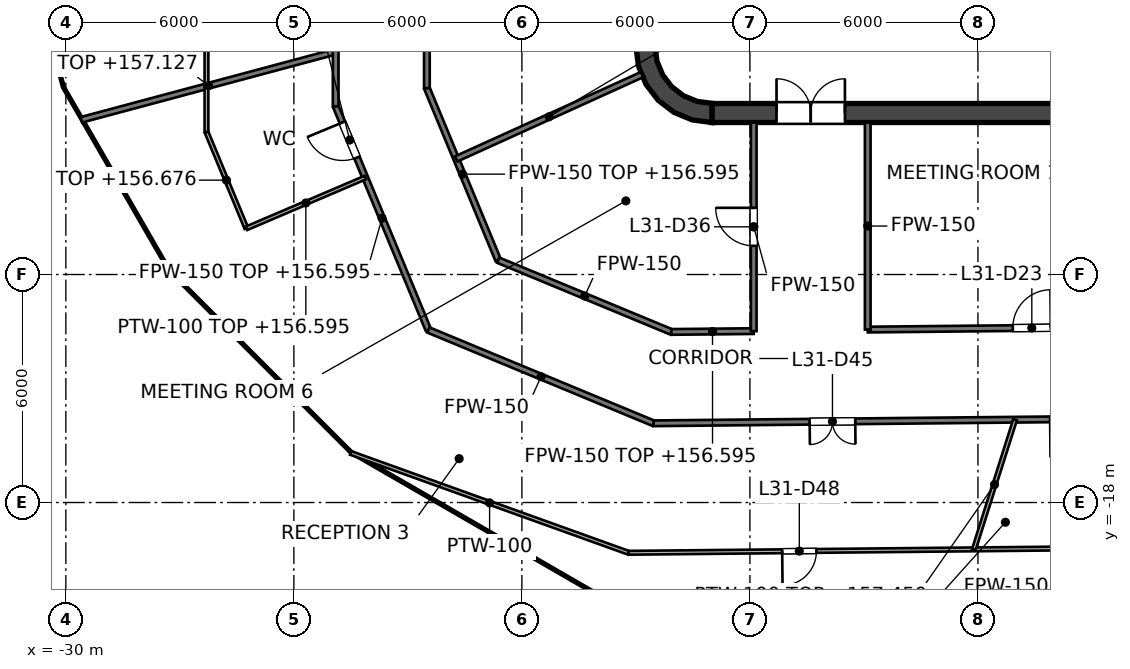
"""IFC4 building model, lengths in metres.
Left out: names, types, materials, properties, quantities, classifications, styles, units other than length and angle.
Written with IfcOpenShell. Run it as: python <this file> out.ifc"""

import sys

from ifc_helpers import new_model, si_unit, direction, frame, frame_2d, origin, place, context, subcontext, project, spatial, polyline, rectangle, outline, extrude, element, fill, save


model = new_model("IFC4")
c1 = context("Model", 3, precision=1e-05, world=origin(), true_north=direction((0.0, 1.0)))
c2 = subcontext(c1, "Body", "Model", "MODEL_VIEW")
j1 = project(units=[si_unit("LENGTHUNIT", "METRE"), si_unit("PLANEANGLEUNIT", "RADIAN")], contexts=[c1])
p1 = place(None, origin())
s1 = spatial("IfcSite", under=j1, at=p1, CompositionType="ELEMENT")
p2 = place(p1, origin())
s2 = spatial("IfcBuilding", under=s1, at=p2, CompositionType="ELEMENT")
p3 = place(p2, frame((0.0, 0.0, 153.6)))
s3 = spatial("IfcBuildingStorey", under=s2, at=p3, CompositionType="ELEMENT", Elevation=153.6)
p4 = place(p3, frame((-13.0, -7.75, 0.0), z_axis=(0.0, 0.0, 1.0), x_axis=(1.0, 0.0, 0.0)))
e1 = element("IfcWall", 1, at=p4, inside=s3, PredefinedType="SHEAR", context=c2, shape_type="SweptSolid", body=[
    extrude(rectangle(XDim=26.0, YDim=0.5, at=frame_2d((13.0, 0.0))), origin(), (0.0, 0.0, 1.0), 4.0),
])
p5 = place(p4, frame((1.7, 0.0, 0.0)))
e2 = element("IfcOpeningElement", 2, at=p5, cuts=e1, PredefinedType="OPENING", context=c2, shape_type="SweptSolid", body=[
    extrude(rectangle(XDim=1.8, YDim=2.1, at=frame_2d((0.9, 1.05))), frame((0.0, 0.25, 0.0), z_axis=(0.0, -1.0, 0.0), x_axis=(1.0, 0.0, 0.0)), (0.0, 0.0, 1.0), 0.5),
])
p6 = place(p4, frame((22.5, 0.0, 0.0)))
e3 = element("IfcOpeningElement", 3, at=p6, cuts=e1, PredefinedType="OPENING", context=c2, shape_type="SweptSolid", body=[
    extrude(rectangle(XDim=1.8, YDim=2.1, at=frame_2d((0.9, 1.05))), frame((0.0, 0.25, 0.0), z_axis=(0.0, -1.0, 0.0), x_axis=(1.0, 0.0, 0.0)), (0.0, 0.0, 1.0), 0.5),
])
p7 = place(p3, origin())
e4 = element("IfcWall", 4, at=p7, inside=s3, PredefinedType="SHEAR", context=c2, shape_type="SweptSolid", body=[
    extrude(outline(polyline([(-13.0, -8.0), (-13.0, -7.496), (-13.387, -7.445), (-13.748, -7.295), (-14.058, -7.058), (-14.295, -6.748), (-14.445, -6.387), (-14.496, -6.0), (-15.0, -6.0), (-14.932, -6.518), (-14.732, -7.0), (-14.414, -7.414), (-14.0, -7.732), (-13.518, -7.932), (-13.0, -8.0)])), origin(), (0.0, 0.0, 1.0), 4.0),
])
p8 = place(p3, frame((-9.0, -6.6, 0.0), z_axis=(0.0, 0.0, 1.0), x_axis=(0.0, 1.0, 0.0)))
e5 = element("IfcWall", 5, at=p8, inside=s3, PredefinedType="PARTITIONING", context=c2, shape_type="SweptSolid", body=[
    extrude(rectangle(XDim=2.5, YDim=0.25, at=frame_2d((1.25, 0.0))), origin(), (0.0, 0.0, 1.0), 3.85),
])
p9 = place(p8, frame((0.75, 0.0, 0.0)))
e6 = element("IfcOpeningElement", 6, at=p9, cuts=e5, PredefinedType="OPENING", context=c2, shape_type="SweptSolid", body=[
    extrude(rectangle(XDim=1.0, YDim=2.1, at=frame_2d((0.5, 1.05))), frame((0.0, 0.125, 0.0), z_axis=(0.0, -1.0, 0.0), x_axis=(1.0, 0.0, 0.0)), (0.0, 0.0, 1.0), 0.25),
])
p10 = place(p3, frame((-9.125, -7.05, 0.0), z_axis=(0.0, 0.0, 1.0), x_axis=(1.0, 0.0, 0.0)))
e7 = element("IfcWall", 7, at=p10, inside=s3, PredefinedType="SOLIDWALL", context=c2, shape_type="SweptSolid", body=[
    extrude(rectangle(XDim=18.25, YDim=0.9, at=frame_2d((9.125, 0.0))), origin(), (0.0, 0.0, 1.0), 3.85),
])
p11 = place(p3, frame((-11.8, -7.5, 0.0), z_axis=(0.0, 0.0, 1.0), x_axis=(0.0, 1.0, 0.0)))
e8 = element("IfcWall", 8, at=p11, inside=s3, PredefinedType="SOLIDWALL", context=c2, shape_type="SweptSolid", body=[
    extrude(rectangle(XDim=15.0, YDim=0.4, at=frame_2d((7.5, 0.0))), origin(), (0.0, 0.0, 1.0), 3.85),
])
p12 = place(p11, frame((11.3, 0.0, 0.0)))
e9 = element("IfcOpeningElement", 9, at=p12, cuts=e8, PredefinedType="OPENING", context=c2, shape_type="SweptSolid", body=[
    extrude(rectangle(XDim=1.1, YDim=2.1, at=frame_2d((0.55, 1.05))), frame((0.0, 0.2, 0.0), z_axis=(0.0, -1.0, 0.0), x_axis=(1.0, 0.0, 0.0)), (0.0, 0.0, 1.0), 0.4),
])
p13 = place(p11, frame((8.4, 0.0, 0.0)))
e10 = element("IfcOpeningElement", 10, at=p13, cuts=e8, PredefinedType="OPENING", context=c2, shape_type="SweptSolid", body=[
    extrude(rectangle(XDim=1.1, YDim=2.1, at=frame_2d((0.55, 1.05))), frame((0.0, 0.2, 0.0), z_axis=(0.0, -1.0, 0.0), x_axis=(1.0, 0.0, 0.0)), (0.0, 0.0, 1.0), 0.4),
])
p14 = place(p11, frame((5.5, 0.0, 0.0)))
e11 = element("IfcOpeningElement", 11, at=p14, cuts=e8, PredefinedType="OPENING", context=c2, shape_type="SweptSolid", body=[
    extrude(rectangle(XDim=1.1, YDim=2.1, at=frame_2d((0.55, 1.05))), frame((0.0, 0.2, 0.0), z_axis=(0.0, -1.0, 0.0), x_axis=(1.0, 0.0, 0.0)), (0.0, 0.0, 1.0), 0.4),
])
p15 = place(p11, frame((13.697, 0.0, 0.0)))
e12 = element("IfcOpeningElement", 12, at=p15, cuts=e8, PredefinedType="OPENING", context=c2, shape_type="SweptSolid", body=[
    extrude(rectangle(XDim=0.9, YDim=2.1, at=frame_2d((0.45, 1.05))), frame((0.0, 0.2, 0.0), z_axis=(0.0, -1.0, 0.0), x_axis=(1.0, 0.0, 0.0)), (0.0, 0.0, 1.0), 0.4),
])
p16 = place(p11, frame((0.403, 0.0, 0.0)))
e13 = element("IfcOpeningElement", 13, at=p16, cuts=e8, PredefinedType="OPENING", context=c2, shape_type="SweptSolid", body=[
    extrude(rectangle(XDim=0.9, YDim=2.1, at=frame_2d((0.45, 1.05))), frame((0.0, 0.2, 0.0), z_axis=(0.0, -1.0, 0.0), x_axis=(1.0, 0.0, 0.0)), (0.0, 0.0, 1.0), 0.4),
])
p17 = place(p3, frame((-22.9, -7.572, 0.0), z_axis=(0.0, 0.0, 1.0), x_axis=(0.382860357704, -0.923806227788, 0.0)))
e14 = element("IfcWall", 14, at=p17, inside=s3, PredefinedType="PARTITIONING", context=c2, shape_type="SweptSolid", body=[
    extrude(rectangle(XDim=6.374, YDim=0.15, at=frame_2d((3.187, 0.0))), origin(), (0.0, 0.0, 1.0), 2.995),
])
p18 = place(p17, frame((0.462, 0.0, 0.0)))
e15 = element("IfcOpeningElement", 15, at=p18, cuts=e14, PredefinedType="OPENING", context=c2, shape_type="SweptSolid", body=[
    extrude(rectangle(XDim=1.0, YDim=2.1, at=frame_2d((0.5, 1.05))), frame((0.0, 0.075, 0.0), z_axis=(0.0, -1.0, 0.0), x_axis=(1.0, 0.0, 0.0)), (0.0, 0.0, 1.0), 0.15),
])
p19 = place(p3, frame((-20.5, -7.095, 0.0), z_axis=(0.0, 0.0, 1.0), x_axis=(0.382878184095, -0.923798839653, 0.0)))
e16 = element("IfcWall", 16, at=p19, inside=s3, PredefinedType="PARTITIONING", context=c2, shape_type="SweptSolid", body=[
    extrude(rectangle(XDim=4.902, YDim=0.15, at=frame_2d((2.451, 0.0))), origin(), (0.0, 0.0, 1.0), 2.995),
])
p20 = place(p3, frame((-20.46, -13.46, 0.0), z_axis=(0.0, 0.0, 1.0), x_axis=(0.923801547606, -0.382871650349, 0.0)))
e17 = element("IfcWall", 17, at=p20, inside=s3, PredefinedType="PARTITIONING", context=c2, shape_type="SweptSolid", body=[
    extrude(rectangle(XDim=6.415, YDim=0.15, at=frame_2d((3.208, 0.0))), origin(), (0.0, 0.0, 1.0), 2.927),
])
p21 = place(p3, frame((-18.623, -11.623, 0.0), z_axis=(0.0, 0.0, 1.0), x_axis=(0.923791670587, -0.38289548098, 0.0)))
e18 = element("IfcWall", 18, at=p21, inside=s3, PredefinedType="PARTITIONING", context=c2, shape_type="SweptSolid", body=[
    extrude(rectangle(XDim=4.931, YDim=0.15, at=frame_2d((2.465, 0.0))), origin(), (0.0, 0.0, 1.0), 2.927),
])
p22 = place(p3, frame((-14.534, -15.915, 0.0), z_axis=(0.0, 0.0, 1.0), x_axis=(0.999950930262, 0.009906415532, 0.0)))
e19 = element("IfcWall", 19, at=p22, inside=s3, PredefinedType="PARTITIONING", context=c2, shape_type="SweptSolid", body=[
    extrude(rectangle(XDim=33.123, YDim=0.15, at=frame_2d((16.561, 0.0))), origin(), (0.0, 0.0, 1.0), 2.927),
])
p23 = place(p22, frame((4.106, 0.0, 0.0)))
e20 = element("IfcOpeningElement", 20, at=p23, cuts=e19, PredefinedType="OPENING", context=c2, shape_type="SweptSolid", body=[
    extrude(rectangle(XDim=1.2, YDim=2.1, at=frame_2d((0.6, 1.05))), frame((0.0, 0.075, 0.0), z_axis=(0.0, -1.0, 0.0), x_axis=(1.0, 0.0, 0.0)), (0.0, 0.0, 1.0), 0.15),
])
p24 = place(p22, frame((10.434, 0.0, 0.0)))
e21 = element("IfcOpeningElement", 21, at=p24, cuts=e19, PredefinedType="OPENING", context=c2, shape_type="SweptSolid", body=[
    extrude(rectangle(XDim=1.0, YDim=2.1, at=frame_2d((0.5, 1.05))), frame((0.0, 0.075, 0.0), z_axis=(0.0, -1.0, 0.0), x_axis=(1.0, 0.0, 0.0)), (0.0, 0.0, 1.0), 0.15),
])
p25 = place(p22, frame((12.942, 0.0, 0.0)))
e22 = element("IfcOpeningElement", 22, at=p25, cuts=e19, PredefinedType="OPENING", context=c2, shape_type="SweptSolid", body=[
    extrude(rectangle(XDim=1.0, YDim=2.1, at=frame_2d((0.5, 1.05))), frame((0.0, 0.075, 0.0), z_axis=(0.0, -1.0, 0.0), x_axis=(1.0, 0.0, 0.0)), (0.0, 0.0, 1.0), 0.15),
])
p26 = place(p22, frame((16.111, 0.0, 0.0)))
e23 = element("IfcOpeningElement", 23, at=p26, cuts=e19, PredefinedType="OPENING", context=c2, shape_type="SweptSolid", body=[
    extrude(rectangle(XDim=1.0, YDim=2.1, at=frame_2d((0.5, 1.05))), frame((0.0, 0.075, 0.0), z_axis=(0.0, -1.0, 0.0), x_axis=(1.0, 0.0, 0.0)), (0.0, 0.0, 1.0), 0.15),
])
p27 = place(p22, frame((24.318, 0.0, 0.0)))
e24 = element("IfcOpeningElement", 24, at=p27, cuts=e19, PredefinedType="OPENING", context=c2, shape_type="SweptSolid", body=[
    extrude(rectangle(XDim=1.0, YDim=2.1, at=frame_2d((0.5, 1.05))), frame((0.0, 0.075, 0.0), z_axis=(0.0, -1.0, 0.0), x_axis=(1.0, 0.0, 0.0)), (0.0, 0.0, 1.0), 0.15),
])
p28 = place(p3, frame((-14.068, -13.511, 0.0), z_axis=(0.0, 0.0, 1.0), x_axis=(0.999950911515, 0.009908307647, 0.0)))
e25 = element("IfcWall", 25, at=p28, inside=s3, PredefinedType="PARTITIONING", context=c2, shape_type="SweptSolid", body=[
    extrude(rectangle(XDim=2.168, YDim=0.15, at=frame_2d((1.084, 0.0))), origin(), (0.0, 0.0, 1.0), 2.995),
])
p29 = place(p3, frame((-8.9, -13.449, 0.0), z_axis=(0.0, 0.0, 1.0), x_axis=(0.999950834077, 0.009916119672, 0.0)))
e26 = element("IfcWall", 26, at=p29, inside=s3, PredefinedType="PARTITIONING", context=c2, shape_type="SweptSolid", body=[
    extrude(rectangle(XDim=17.801, YDim=0.15, at=frame_2d((8.9, 0.0))), origin(), (0.0, 0.0, 1.0), 2.927),
])
p30 = place(p29, frame((3.818, 0.0, 0.0)))
e27 = element("IfcOpeningElement", 27, at=p30, cuts=e26, PredefinedType="OPENING", context=c2, shape_type="SweptSolid", body=[
    extrude(rectangle(XDim=1.0, YDim=2.1, at=frame_2d((0.5, 1.05))), frame((0.0, 0.075, 0.0), z_axis=(0.0, -1.0, 0.0), x_axis=(1.0, 0.0, 0.0)), (0.0, 0.0, 1.0), 0.15),
])
p31 = place(p29, frame((8.391, 0.0, 0.0)))
e28 = element("IfcOpeningElement", 28, at=p31, cuts=e26, PredefinedType="OPENING", context=c2, shape_type="SweptSolid", body=[
    extrude(rectangle(XDim=1.0, YDim=2.1, at=frame_2d((0.5, 1.05))), frame((0.0, 0.075, 0.0), z_axis=(0.0, -1.0, 0.0), x_axis=(1.0, 0.0, 0.0)), (0.0, 0.0, 1.0), 0.15),
])
p32 = place(p29, frame((12.975, 0.0, 0.0)))
e29 = element("IfcOpeningElement", 29, at=p32, cuts=e26, PredefinedType="OPENING", context=c2, shape_type="SweptSolid", body=[
    extrude(rectangle(XDim=1.0, YDim=2.1, at=frame_2d((0.5, 1.05))), frame((0.0, 0.075, 0.0), z_axis=(0.0, -1.0, 0.0), x_axis=(1.0, 0.0, 0.0)), (0.0, 0.0, 1.0), 0.15),
])
p33 = place(p3, frame((-29.591, -7.929, 0.0), z_axis=(0.0, 0.0, 1.0), x_axis=(0.965923037728, 0.258829451931, 0.0)))
e30 = element("IfcWall", 30, at=p33, inside=s3, PredefinedType="PARTITIONING", context=c2, shape_type="SweptSolid", body=[
    extrude(rectangle(XDim=6.927, YDim=0.15, at=frame_2d((3.464, 0.0))), origin(), (0.0, 0.0, 1.0), 3.527),
])
p34 = place(p3, frame((-19.728, -8.958, 0.0), z_axis=(0.0, 0.0, 1.0), x_axis=(0.910629511797, 0.413223779863, 0.0)))
e31 = element("IfcWall", 31, at=p34, inside=s3, PredefinedType="PARTITIONING", context=c2, shape_type="SweptSolid", body=[
    extrude(rectangle(XDim=5.368, YDim=0.15, at=frame_2d((2.684, 0.0))), origin(), (0.0, 0.0, 1.0), 3.85),
])
p35 = place(p3, frame((-8.9, -13.449, 0.0), z_axis=(0.0, 0.0, 1.0), x_axis=(0.0, 1.0, 0.0)))
e32 = element("IfcWall", 32, at=p35, inside=s3, PredefinedType="PARTITIONING", context=c2, shape_type="SweptSolid", body=[
    extrude(rectangle(XDim=5.449, YDim=0.15, at=frame_2d((2.725, 0.0))), origin(), (0.0, 0.0, 1.0), 2.927),
])
p36 = place(p3, frame((-11.9, -13.49, 0.0), z_axis=(0.0, 0.0, 1.0), x_axis=(0.0, 1.0, 0.0)))
e33 = element("IfcWall", 33, at=p36, inside=s3, PredefinedType="PARTITIONING", context=c2, shape_type="SweptSolid", body=[
    extrude(rectangle(XDim=5.49, YDim=0.15, at=frame_2d((2.745, 0.0))), origin(), (0.0, 0.0, 1.0), 2.927),
])
p37 = place(p36, frame((2.245, 0.0, 0.0)))
e34 = element("IfcOpeningElement", 34, at=p37, cuts=e33, PredefinedType="OPENING", context=c2, shape_type="SweptSolid", body=[
    extrude(rectangle(XDim=1.0, YDim=2.1, at=frame_2d((0.5, 1.05))), frame((0.0, 0.075, 0.0), z_axis=(0.0, -1.0, 0.0), x_axis=(1.0, 0.0, 0.0)), (0.0, 0.0, 1.0), 0.15),
])
p38 = place(p3, frame((-20.5, -7.095, 0.0), z_axis=(0.0, 0.0, 1.0), x_axis=(0.0, 1.0, 0.0)))
e35 = element("IfcWall", 35, at=p38, inside=s3, PredefinedType="PARTITIONING", context=c2, shape_type="SweptSolid", body=[
    extrude(rectangle(XDim=14.569, YDim=0.15, at=frame_2d((7.285, 0.0))), origin(), (0.0, 0.0, 1.0), 2.927),
])
p39 = place(p38, frame((10.234, 0.0, 0.0)))
e36 = element("IfcOpeningElement", 36, at=p39, cuts=e35, PredefinedType="OPENING", context=c2, shape_type="SweptSolid", body=[
    extrude(rectangle(XDim=1.0, YDim=2.1, at=frame_2d((0.5, 1.05))), frame((0.0, 0.075, 0.0), z_axis=(0.0, -1.0, 0.0), x_axis=(1.0, 0.0, 0.0)), (0.0, 0.0, 1.0), 0.15),
])
p40 = place(p38, frame((3.0, 0.0, 0.0)))
e37 = element("IfcOpeningElement", 37, at=p40, cuts=e35, PredefinedType="OPENING", context=c2, shape_type="SweptSolid", body=[
    extrude(rectangle(XDim=1.0, YDim=2.1, at=frame_2d((0.5, 1.05))), frame((0.0, 0.075, 0.0), z_axis=(0.0, -1.0, 0.0), x_axis=(1.0, 0.0, 0.0)), (0.0, 0.0, 1.0), 0.15),
])
p41 = place(p3, frame((-22.9, -7.572, 0.0), z_axis=(0.0, 0.0, 1.0), x_axis=(0.0, 1.0, 0.0)))
e38 = element("IfcWall", 38, at=p41, inside=s3, PredefinedType="PARTITIONING", context=c2, shape_type="SweptSolid", body=[
    extrude(rectangle(XDim=15.689, YDim=0.15, at=frame_2d((7.844, 0.0))), origin(), (0.0, 0.0, 1.0), 2.927),
])
p42 = place(p41, frame((8.062, 0.0, 0.0)))
e39 = element("IfcOpeningElement", 39, at=p42, cuts=e38, PredefinedType="OPENING", context=c2, shape_type="SweptSolid", body=[
    extrude(rectangle(XDim=1.0, YDim=2.1, at=frame_2d((0.5, 1.05))), frame((0.0, 0.075, 0.0), z_axis=(0.0, -1.0, 0.0), x_axis=(1.0, 0.0, 0.0)), (0.0, 0.0, 1.0), 0.15),
])
p43 = place(p3, frame((-26.3, -8.249, 0.0), z_axis=(0.0, 0.0, 1.0), x_axis=(0.382878044957, -0.92379889732, 0.0)))
e40 = element("IfcWall", 40, at=p43, inside=s3, PredefinedType="PARTITIONING", context=c2, shape_type="SweptSolid", body=[
    extrude(rectangle(XDim=2.745, YDim=0.1, at=frame_2d((1.373, 0.0))), origin(), (0.0, 0.0, 1.0), 3.076),
])
p44 = place(p3, frame((-22.506, -16.695, 0.0), z_axis=(0.0, 0.0, 1.0), x_axis=(0.941067528236, -0.338218727009, 0.0)))
e41 = element("IfcWall", 41, at=p44, inside=s3, PredefinedType="PARTITIONING", context=c2, shape_type="SweptSolid", body=[
    extrude(rectangle(XDim=7.77, YDim=0.1, at=frame_2d((3.885, 0.0))), origin(), (0.0, 0.0, 1.0), 2.927),
])
p45 = place(p3, frame((-15.194, -19.323, 0.0), z_axis=(0.0, 0.0, 1.0), x_axis=(0.999950976029, 0.009901794681, 0.0)))
e42 = element("IfcWall", 42, at=p45, inside=s3, PredefinedType="PARTITIONING", context=c2, shape_type="SweptSolid", body=[
    extrude(rectangle(XDim=33.73, YDim=0.1, at=frame_2d((16.865, 0.0))), origin(), (0.0, 0.0, 1.0), 2.927),
])
p46 = place(p45, frame((4.043, 0.0, 0.0)))
e43 = element("IfcOpeningElement", 43, at=p46, cuts=e42, PredefinedType="OPENING", context=c2, shape_type="SweptSolid", body=[
    extrude(rectangle(XDim=0.9, YDim=2.1, at=frame_2d((0.45, 1.05))), frame((0.0, 0.05, 0.0), z_axis=(0.0, -1.0, 0.0), x_axis=(1.0, 0.0, 0.0)), (0.0, 0.0, 1.0), 0.1),
])
p47 = place(p45, frame((26.398, 0.0, 0.0)))
e44 = element("IfcOpeningElement", 44, at=p47, cuts=e42, PredefinedType="OPENING", context=c2, shape_type="SweptSolid", body=[
    extrude(rectangle(XDim=0.9, YDim=2.1, at=frame_2d((0.45, 1.05))), frame((0.0, 0.05, 0.0), z_axis=(0.0, -1.0, 0.0), x_axis=(1.0, 0.0, 0.0)), (0.0, 0.0, 1.0), 0.1),
])
p48 = place(p3, frame((-25.249, -10.785, 0.0), z_axis=(0.0, 0.0, 1.0), x_axis=(0.919590085221, 0.392879211925, 0.0)))
e45 = element("IfcWall", 45, at=p48, inside=s3, PredefinedType="PARTITIONING", context=c2, shape_type="SweptSolid", body=[
    extrude(rectangle(XDim=3.4, YDim=0.1, at=frame_2d((1.7, 0.0))), origin(), (0.0, 0.0, 1.0), 2.995),
])
p49 = place(p3, frame((-6.106, -19.233, 0.0), z_axis=(0.0, 0.0, 1.0), x_axis=(0.302626350856, 0.95310927588, 0.0)))
e46 = element("IfcWall", 46, at=p49, inside=s3, PredefinedType="PARTITIONING", context=c2, shape_type="SweptSolid", body=[
    extrude(rectangle(XDim=3.579, YDim=0.1, at=frame_2d((1.789, 0.0))), origin(), (0.0, 0.0, 1.0), 3.85),
])
p50 = place(p3, frame((-26.3, -8.249, 0.0), z_axis=(0.0, 0.0, 1.0), x_axis=(0.0, 1.0, 0.0)))
e47 = element("IfcWall", 47, at=p50, inside=s3, PredefinedType="PARTITIONING", context=c2, shape_type="SweptSolid", body=[
    extrude(rectangle(XDim=17.277, YDim=0.1, at=frame_2d((8.639, 0.0))), origin(), (0.0, 0.0, 1.0), 2.927),
])
p51 = place(p50, frame((8.739, 0.0, 0.0)))
e48 = element("IfcOpeningElement", 48, at=p51, cuts=e47, PredefinedType="OPENING", context=c2, shape_type="SweptSolid", body=[
    extrude(rectangle(XDim=0.9, YDim=2.1, at=frame_2d((0.45, 1.05))), frame((0.0, 0.05, 0.0), z_axis=(0.0, -1.0, 0.0), x_axis=(1.0, 0.0, 0.0)), (0.0, 0.0, 1.0), 0.1),
])
p52 = place(p16, origin())
e49 = element("IfcDoor", 49, at=p52, inside=s3, OperationType="SINGLE_SWING_LEFT", PredefinedType="DOOR", context=c2, shape_type="SweptSolid", body=[
    extrude(rectangle(XDim=0.9, YDim=2.1, at=frame_2d((0.45, 1.05))), frame((0.0, 0.025, 0.0), z_axis=(0.0, -1.0, 0.0), x_axis=(1.0, 0.0, 0.0)), (0.0, 0.0, 1.0), 0.05),
])
fill(e13, e49)
p53 = place(p5, origin())
e50 = element("IfcDoor", 50, at=p53, inside=s3, OperationType="DOUBLE_DOOR_SINGLE_SWING", PredefinedType="DOOR", context=c2, shape_type="SweptSolid", body=[
    extrude(rectangle(XDim=1.8, YDim=2.1, at=frame_2d((0.9, 1.05))), frame((0.0, 0.025, 0.0), z_axis=(0.0, -1.0, 0.0), x_axis=(1.0, 0.0, 0.0)), (0.0, 0.0, 1.0), 0.05),
])
fill(e2, e50)
p54 = place(p30, origin())
e51 = element("IfcDoor", 51, at=p54, inside=s3, OperationType="SINGLE_SWING_RIGHT", PredefinedType="DOOR", context=c2, shape_type="SweptSolid", body=[
    extrude(rectangle(XDim=1.0, YDim=2.1, at=frame_2d((0.5, 1.05))), frame((0.0, 0.025, 0.0), z_axis=(0.0, -1.0, 0.0), x_axis=(1.0, 0.0, 0.0)), (0.0, 0.0, 1.0), 0.05),
])
fill(e27, e51)
p55 = place(p37, origin())
e52 = element("IfcDoor", 52, at=p55, inside=s3, OperationType="SINGLE_SWING_RIGHT", PredefinedType="DOOR", context=c2, shape_type="SweptSolid", body=[
    extrude(rectangle(XDim=1.0, YDim=2.1, at=frame_2d((0.5, 1.05))), frame((0.0, 0.025, 0.0), z_axis=(0.0, -1.0, 0.0), x_axis=(1.0, 0.0, 0.0)), (0.0, 0.0, 1.0), 0.05),
])
fill(e34, e52)
p56 = place(p18, origin())
e53 = element("IfcDoor", 53, at=p56, inside=s3, OperationType="SINGLE_SWING_LEFT", PredefinedType="DOOR", context=c2, shape_type="SweptSolid", body=[
    extrude(rectangle(XDim=1.0, YDim=2.1, at=frame_2d((0.5, 1.05))), frame((0.0, 0.025, 0.0), z_axis=(0.0, -1.0, 0.0), x_axis=(1.0, 0.0, 0.0)), (0.0, 0.0, 1.0), 0.05),
])
fill(e15, e53)
p57 = place(p23, origin())
e54 = element("IfcDoor", 54, at=p57, inside=s3, OperationType="DOUBLE_DOOR_SINGLE_SWING", PredefinedType="DOOR", context=c2, shape_type="SweptSolid", body=[
    extrude(rectangle(XDim=1.2, YDim=2.1, at=frame_2d((0.6, 1.05))), frame((0.0, 0.025, 0.0), z_axis=(0.0, -1.0, 0.0), x_axis=(1.0, 0.0, 0.0)), (0.0, 0.0, 1.0), 0.05),
])
fill(e20, e54)
p58 = place(p24, origin())
e55 = element("IfcDoor", 55, at=p58, inside=s3, OperationType="SINGLE_SWING_LEFT", PredefinedType="DOOR", context=c2, shape_type="SweptSolid", body=[
    extrude(rectangle(XDim=1.0, YDim=2.1, at=frame_2d((0.5, 1.05))), frame((0.0, 0.025, 0.0), z_axis=(0.0, -1.0, 0.0), x_axis=(1.0, 0.0, 0.0)), (0.0, 0.0, 1.0), 0.05),
])
fill(e21, e55)
p59 = place(p46, origin())
e56 = element("IfcDoor", 56, at=p59, inside=s3, OperationType="SINGLE_SWING_LEFT", PredefinedType="DOOR", context=c2, shape_type="SweptSolid", body=[
    extrude(rectangle(XDim=0.9, YDim=2.1, at=frame_2d((0.45, 1.05))), frame((0.0, 0.025, 0.0), z_axis=(0.0, -1.0, 0.0), x_axis=(1.0, 0.0, 0.0)), (0.0, 0.0, 1.0), 0.05),
])
fill(e43, e56)
save(model, sys.argv[1])
